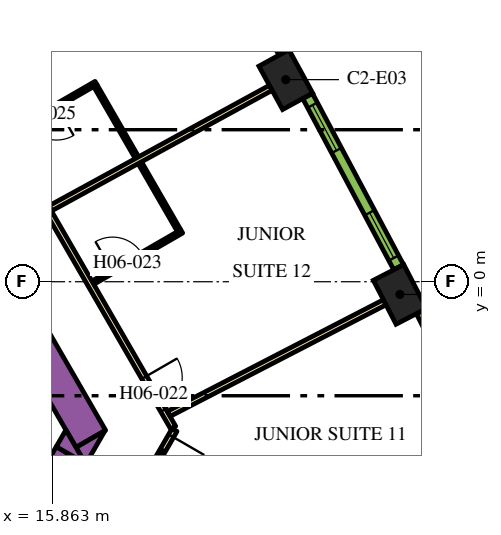
"""IFC4 building model, lengths in metres.
Left out: names, types, materials, properties, quantities, classifications, styles, units other than length and angle.
Written with IfcOpenShell. Run it as: python <this file> out.ifc"""

import sys

from ifc_helpers import new_model, si_unit, direction, frame, frame_2d, origin, origin_2d, place, context, subcontext, project, spatial, polyline, rectangle, outline, extrude, element, fill, save


model = new_model("IFC4")
c1 = context("Model", 3, precision=1e-05, world=origin(), true_north=direction((0.0, 1.0)))
c2 = subcontext(c1, "Body", "Model", "MODEL_VIEW")
j1 = project(units=[si_unit("LENGTHUNIT", "METRE"), si_unit("PLANEANGLEUNIT", "RADIAN")], contexts=[c1])
p1 = place(None, origin())
s1 = spatial("IfcSite", under=j1, at=p1, CompositionType="ELEMENT")
p2 = place(p1, origin())
s2 = spatial("IfcBuilding", under=s1, at=p2, CompositionType="ELEMENT")
p3 = place(p2, frame((0.0, 0.0, 91.5)))
s3 = spatial("IfcBuildingStorey", under=s2, at=p3, CompositionType="ELEMENT", Elevation=91.5)
for number, where, z_axis, x_axis in (
    (1, (25.012, -0.334, 0.0), (0.0, 0.0, 1.0), (-0.459, 0.888, 0.0)),
    (2, (22.009, 5.317, 0.0), (0.0, 0.0, 1.0), (-0.48, 0.877, 0.0)),
):
    element("IfcColumn", number, at=place(p3, frame(where, z_axis=z_axis, x_axis=x_axis)), inside=s3, PredefinedType="COLUMN", context=c2, shape_type="SweptSolid", body=[
        extrude(rectangle(XDim=1.3, YDim=0.9, at=origin_2d()), origin(), (0.0, 0.0, 1.0), 3.9),
    ])
p4 = place(p3, frame((6.776, 13.364, 0.0), z_axis=(0.0, 0.0, 1.0), x_axis=(0.500004177138, -0.8660229921, 0.0)))
e3 = element("IfcWall", 3, at=p4, inside=s3, PredefinedType="SOLIDWALL", context=c2, shape_type="SweptSolid", body=[
    extrude(rectangle(XDim=20.204, YDim=0.9, at=frame_2d((10.102, 0.0))), origin(), (0.0, 0.0, 1.0), 3.9),
])
p5 = place(p3, origin())
e4 = element("IfcWall", 4, at=p5, inside=s3, PredefinedType="SOLIDWALL", context=c2, shape_type="SweptSolid", body=[
    extrude(outline(polyline([(16.743, -4.8), (16.489, -4.36), (17.251, -3.92), (16.743, -4.8)])), origin(), (0.0, 0.0, 1.0), 3.9),
])
p6 = place(p3, frame((11.695, -12.644, 0.0), z_axis=(0.0, 0.0, 1.0), x_axis=(0.500010229568, 0.86601949766, 0.0)))
e5 = element("IfcWall", 5, at=p6, inside=s3, PredefinedType="SOLIDWALL", context=c2, shape_type="SweptSolid", body=[
    extrude(rectangle(XDim=9.326, YDim=0.9, at=frame_2d((4.663, 0.0))), origin(), (0.0, 0.0, 1.0), 3.9),
])
e6 = element("IfcWall", 6, at=p5, inside=s3, PredefinedType="SOLIDWALL", context=c2, shape_type="SweptSolid", body=[
    extrude(outline(polyline([(16.223, -3.9), (16.732, -4.78), (15.969, -4.34), (16.223, -3.9)])), origin(), (0.0, 0.0, 1.0), 3.9),
])
p7 = place(p3, frame((19.081, -3.9, 0.0), z_axis=(0.0, 0.0, 1.0), x_axis=(-0.499974327079, -0.866040225545, 0.0)))
e7 = element("IfcWall", 7, at=p7, inside=s3, PredefinedType="PARTITIONING", context=c2, shape_type="SweptSolid", body=[
    extrude(rectangle(XDim=5.258, YDim=0.15, at=frame_2d((2.629, 0.0))), origin(), (0.0, 0.0, 1.0), 2.75),
])
p8 = place(p7, frame((0.18, 0.0, 0.0)))
e8 = element("IfcOpeningElement", 8, at=p8, cuts=e7, PredefinedType="OPENING", context=c2, shape_type="SweptSolid", body=[
    extrude(rectangle(XDim=1.0, YDim=2.1, at=frame_2d((0.5, 1.05))), frame((0.0, 0.085, 0.0), z_axis=(0.0, -1.0, 0.0), x_axis=(1.0, 0.0, 0.0)), (0.0, 0.0, 1.0), 0.17),
])
p9 = place(p3, frame((6.163, 18.475, 0.0), z_axis=(0.0, 0.0, 1.0), x_axis=(0.500001317485, -0.866024643133, 0.0)))
e9 = element("IfcWall", 9, at=p9, inside=s3, PredefinedType="PARTITIONING", context=c2, shape_type="SweptSolid", body=[
    extrude(rectangle(XDim=25.767, YDim=0.15, at=frame_2d((12.883, 0.0))), origin(), (0.0, 0.0, 1.0), 2.75),
])
p10 = place(p9, frame((24.241, 0.0, 0.0)))
e10 = element("IfcOpeningElement", 10, at=p10, cuts=e9, PredefinedType="OPENING", context=c2, shape_type="SweptSolid", body=[
    extrude(rectangle(XDim=1.0, YDim=2.1, at=frame_2d((0.5, 1.05))), frame((0.0, 0.085, 0.0), z_axis=(0.0, -1.0, 0.0), x_axis=(1.0, 0.0, 0.0)), (0.0, 0.0, 1.0), 0.17),
])
p11 = place(p9, frame((13.144, 0.0, 0.0)))
e11 = element("IfcOpeningElement", 11, at=p11, cuts=e9, PredefinedType="OPENING", context=c2, shape_type="SweptSolid", body=[
    extrude(rectangle(XDim=1.0, YDim=2.1, at=frame_2d((0.5, 1.05))), frame((0.0, 0.085, 0.0), z_axis=(0.0, -1.0, 0.0), x_axis=(1.0, 0.0, 0.0)), (0.0, 0.0, 1.0), 0.17),
])
p12 = place(p9, frame((10.874, 0.0, 0.0)))
e12 = element("IfcOpeningElement", 12, at=p12, cuts=e9, PredefinedType="OPENING", context=c2, shape_type="SweptSolid", body=[
    extrude(rectangle(XDim=0.9, YDim=2.1, at=frame_2d((0.45, 1.05))), frame((0.0, 0.085, 0.0), z_axis=(0.0, -1.0, 0.0), x_axis=(1.0, 0.0, 0.0)), (0.0, 0.0, 1.0), 0.17),
])
p13 = place(p9, frame((3.718, 0.0, 0.0)))
e13 = element("IfcOpeningElement", 13, at=p13, cuts=e9, PredefinedType="OPENING", context=c2, shape_type="SweptSolid", body=[
    extrude(rectangle(XDim=1.1, YDim=2.1, at=frame_2d((0.55, 1.05))), frame((0.0, 0.085, 0.0), z_axis=(0.0, -1.0, 0.0), x_axis=(1.0, 0.0, 0.0)), (0.0, 0.0, 1.0), 0.17),
])
p14 = place(p9, frame((2.411, 0.0, 0.0)))
e14 = element("IfcOpeningElement", 14, at=p14, cuts=e9, PredefinedType="OPENING", context=c2, shape_type="SweptSolid", body=[
    extrude(rectangle(XDim=1.0, YDim=2.1, at=frame_2d((0.5, 1.05))), frame((0.0, 0.085, 0.0), z_axis=(0.0, -1.0, 0.0), x_axis=(1.0, 0.0, 0.0)), (0.0, 0.0, 1.0), 0.17),
])
p15 = place(p3, frame((21.614, 5.102, 0.0), z_axis=(0.0, 0.0, 1.0), x_axis=(-0.877484555087, -0.479604895287, 0.0)))
e15 = element("IfcWall", 15, at=p15, inside=s3, PredefinedType="PARTITIONING", context=c2, shape_type="SweptSolid", body=[
    extrude(rectangle(XDim=6.611, YDim=0.15, at=frame_2d((3.306, 0.0))), origin(), (0.0, 0.0, 1.0), 2.75),
])
p16 = place(p3, frame((24.613, -0.541, 0.0), z_axis=(0.0, 0.0, 1.0), x_axis=(-0.888459912519, -0.458954228487, 0.0)))
e16 = element("IfcWall", 16, at=p16, inside=s3, PredefinedType="PARTITIONING", context=c2, shape_type="SweptSolid", body=[
    extrude(rectangle(XDim=6.392, YDim=0.15, at=frame_2d((3.196, 0.0))), origin(), (0.0, 0.0, 1.0), 2.75),
])
p17 = place(p3, frame((16.931, -0.026, 0.0), z_axis=(0.0, 0.0, 1.0), x_axis=(0.866059108428, 0.4999416173, 0.0)))
e17 = element("IfcWall", 17, at=p17, inside=s3, PredefinedType="PARTITIONING", context=c2, shape_type="SweptSolid", body=[
    extrude(rectangle(XDim=2.7, YDim=0.1, at=frame_2d((1.35, 0.0))), origin(), (0.0, 0.0, 1.0), 2.75),
])
p18 = place(p17, frame((0.6, 0.0, 0.0)))
e18 = element("IfcOpeningElement", 18, at=p18, cuts=e17, PredefinedType="OPENING", context=c2, shape_type="SweptSolid", body=[
    extrude(rectangle(XDim=0.9, YDim=2.1, at=frame_2d((0.45, 1.05))), frame((0.0, 0.06, 0.0), z_axis=(0.0, -1.0, 0.0), x_axis=(1.0, 0.0, 0.0)), (0.0, 0.0, 1.0), 0.12),
])
p19 = place(p3, frame((19.196, 1.351, 0.0), z_axis=(0.0, 0.0, 1.0), x_axis=(-0.499956128963, 0.866050731258, 0.0)))
e19 = element("IfcWall", 19, at=p19, inside=s3, PredefinedType="PARTITIONING", context=c2, shape_type="SweptSolid", body=[
    extrude(rectangle(XDim=2.05, YDim=0.1, at=frame_2d((1.025, 0.0))), origin(), (0.0, 0.0, 1.0), 2.75),
])
p20 = place(p3, frame((17.016, 5.228, 0.0), z_axis=(0.0, 0.0, 1.0), x_axis=(-0.86599734893, -0.500048589285, 0.0)))
e20 = element("IfcWall", 20, at=p20, inside=s3, PredefinedType="PARTITIONING", context=c2, shape_type="SweptSolid", body=[
    extrude(rectangle(XDim=2.7, YDim=0.1, at=frame_2d((1.35, 0.0))), origin(), (0.0, 0.0, 1.0), 2.75),
])
p21 = place(p20, frame((1.2, 0.0, 0.0)))
e21 = element("IfcOpeningElement", 21, at=p21, cuts=e20, PredefinedType="OPENING", context=c2, shape_type="SweptSolid", body=[
    extrude(rectangle(XDim=0.9, YDim=2.1, at=frame_2d((0.45, 1.05))), frame((0.0, 0.06, 0.0), z_axis=(0.0, -1.0, 0.0), x_axis=(1.0, 0.0, 0.0)), (0.0, 0.0, 1.0), 0.12),
])
p22 = place(p3, frame((16.997, 5.16, 0.0), z_axis=(0.0, 0.0, 1.0), x_axis=(0.500011965869, -0.866018495177, 0.0)))
e22 = element("IfcWall", 22, at=p22, inside=s3, PredefinedType="PARTITIONING", context=c2, shape_type="SweptSolid", body=[
    extrude(rectangle(XDim=2.19, YDim=0.1, at=frame_2d((1.095, 0.0))), origin(), (0.0, 0.0, 1.0), 2.75),
])
p23 = place(p3, frame((27.864, -5.336, 0.0), z_axis=(0.0, 0.0, 1.0), x_axis=(-0.448534297211, 0.893765620409, 0.0)))
e23 = element("IfcWall", 23, at=p23, inside=s3, PredefinedType="SOLIDWALL", context=c2, shape_type="SweptSolid", body=[
    extrude(rectangle(XDim=5.1, YDim=0.29, at=frame_2d((2.55, 0.0))), origin(), (0.0, 0.0, 1.0), 3.65),
])
p24 = place(p23, frame((0.272, 0.0, 0.9)))
e24 = element("IfcOpeningElement", 24, at=p24, cuts=e23, PredefinedType="OPENING", context=c2, shape_type="SweptSolid", body=[
    extrude(rectangle(XDim=1.35, YDim=2.15, at=frame_2d((0.675, 1.075))), frame((0.0, 0.155, 0.0), z_axis=(0.0, -1.0, 0.0), x_axis=(1.0, 0.0, 0.0)), (0.0, 0.0, 1.0), 0.31),
])
p25 = place(p23, frame((3.478, 0.0, 0.9)))
e25 = element("IfcOpeningElement", 25, at=p25, cuts=e23, PredefinedType="OPENING", context=c2, shape_type="SweptSolid", body=[
    extrude(rectangle(XDim=1.35, YDim=2.15, at=frame_2d((0.675, 1.075))), frame((0.0, 0.155, 0.0), z_axis=(0.0, -1.0, 0.0), x_axis=(1.0, 0.0, 0.0)), (0.0, 0.0, 1.0), 0.31),
])
p26 = place(p3, frame((24.977, 0.383, 0.0), z_axis=(0.0, 0.0, 1.0), x_axis=(-0.469323203119, 0.883026461106, 0.0)))
e26 = element("IfcWall", 26, at=p26, inside=s3, PredefinedType="SOLIDWALL", context=c2, shape_type="SweptSolid", body=[
    extrude(rectangle(XDim=5.101, YDim=0.29, at=frame_2d((2.55, 0.0))), origin(), (0.0, 0.0, 1.0), 3.65),
])
p27 = place(p26, frame((0.273, 0.0, 0.9)))
e27 = element("IfcOpeningElement", 27, at=p27, cuts=e26, PredefinedType="OPENING", context=c2, shape_type="SweptSolid", body=[
    extrude(rectangle(XDim=1.35, YDim=2.15, at=frame_2d((0.675, 1.075))), frame((0.0, 0.155, 0.0), z_axis=(0.0, -1.0, 0.0), x_axis=(1.0, 0.0, 0.0)), (0.0, 0.0, 1.0), 0.31),
])
p28 = place(p26, frame((3.478, 0.0, 0.9)))
e28 = element("IfcOpeningElement", 28, at=p28, cuts=e26, PredefinedType="OPENING", context=c2, shape_type="SweptSolid", body=[
    extrude(rectangle(XDim=1.35, YDim=2.15, at=frame_2d((0.675, 1.075))), frame((0.0, 0.155, 0.0), z_axis=(0.0, -1.0, 0.0), x_axis=(1.0, 0.0, 0.0)), (0.0, 0.0, 1.0), 0.31),
])
p29 = place(p3, frame((21.956, 6.033, 0.0), z_axis=(0.0, 0.0, 1.0), x_axis=(-0.48983164787, 0.87181704316, 0.0)))
e29 = element("IfcWall", 29, at=p29, inside=s3, PredefinedType="SOLIDWALL", context=c2, shape_type="SweptSolid", body=[
    extrude(rectangle(XDim=5.1, YDim=0.29, at=frame_2d((2.55, 0.0))), origin(), (0.0, 0.0, 1.0), 3.65),
])
p30 = place(p29, frame((0.273, 0.0, 0.9)))
e30 = element("IfcOpeningElement", 30, at=p30, cuts=e29, PredefinedType="OPENING", context=c2, shape_type="SweptSolid", body=[
    extrude(rectangle(XDim=1.35, YDim=2.15, at=frame_2d((0.675, 1.075))), frame((0.0, 0.155, 0.0), z_axis=(0.0, -1.0, 0.0), x_axis=(1.0, 0.0, 0.0)), (0.0, 0.0, 1.0), 0.31),
])
p31 = place(p29, frame((3.478, 0.0, 0.9)))
e31 = element("IfcOpeningElement", 31, at=p31, cuts=e29, PredefinedType="OPENING", context=c2, shape_type="SweptSolid", body=[
    extrude(rectangle(XDim=1.35, YDim=2.15, at=frame_2d((0.675, 1.075))), frame((0.0, 0.155, 0.0), z_axis=(0.0, -1.0, 0.0), x_axis=(1.0, 0.0, 0.0)), (0.0, 0.0, 1.0), 0.31),
])
p32 = place(p8, origin())
e32 = element("IfcDoor", 32, at=p32, inside=s3, OperationType="SINGLE_SWING_LEFT", PredefinedType="DOOR", context=c2, shape_type="SweptSolid", body=[
    extrude(rectangle(XDim=1.0, YDim=2.1, at=frame_2d((0.5, 1.05))), frame((0.0, 0.025, 0.0), z_axis=(0.0, -1.0, 0.0), x_axis=(1.0, 0.0, 0.0)), (0.0, 0.0, 1.0), 0.05),
])
fill(e8, e32)
p33 = place(p10, origin())
e33 = element("IfcDoor", 33, at=p33, inside=s3, OperationType="SINGLE_SWING_RIGHT", PredefinedType="DOOR", context=c2, shape_type="SweptSolid", body=[
    extrude(rectangle(XDim=1.0, YDim=2.1, at=frame_2d((0.5, 1.05))), frame((0.0, 0.025, 0.0), z_axis=(0.0, -1.0, 0.0), x_axis=(1.0, 0.0, 0.0)), (0.0, 0.0, 1.0), 0.05),
])
fill(e10, e33)
p34 = place(p18, origin())
e34 = element("IfcDoor", 34, at=p34, inside=s3, OperationType="SINGLE_SWING_RIGHT", PredefinedType="DOOR", context=c2, shape_type="SweptSolid", body=[
    extrude(rectangle(XDim=0.9, YDim=2.1, at=frame_2d((0.45, 1.05))), frame((0.0, 0.025, 0.0), z_axis=(0.0, -1.0, 0.0), x_axis=(1.0, 0.0, 0.0)), (0.0, 0.0, 1.0), 0.05),
])
fill(e18, e34)
p35 = place(p21, origin())
e35 = element("IfcDoor", 35, at=p35, inside=s3, OperationType="SINGLE_SWING_LEFT", PredefinedType="DOOR", context=c2, shape_type="SweptSolid", body=[
    extrude(rectangle(XDim=0.9, YDim=2.1, at=frame_2d((0.45, 1.05))), frame((0.0, 0.025, 0.0), z_axis=(0.0, -1.0, 0.0), x_axis=(1.0, 0.0, 0.0)), (0.0, 0.0, 1.0), 0.05),
])
fill(e21, e35)
p36 = place(p27, origin())
e36 = element("IfcWindow", 36, at=p36, inside=s3, PartitioningType="DOUBLE_PANEL_VERTICAL", PredefinedType="WINDOW", context=c2, shape_type="SweptSolid", body=[
    extrude(rectangle(XDim=1.35, YDim=2.15, at=frame_2d((0.675, 1.075))), frame((0.0, 0.015, 0.0), z_axis=(0.0, -1.0, 0.0), x_axis=(1.0, 0.0, 0.0)), (0.0, 0.0, 1.0), 0.06),
])
fill(e27, e36)
p37 = place(p28, origin())
e37 = element("IfcWindow", 37, at=p37, inside=s3, PartitioningType="DOUBLE_PANEL_VERTICAL", PredefinedType="WINDOW", context=c2, shape_type="SweptSolid", body=[
    extrude(rectangle(XDim=1.35, YDim=2.15, at=frame_2d((0.675, 1.075))), frame((0.0, 0.015, 0.0), z_axis=(0.0, -1.0, 0.0), x_axis=(1.0, 0.0, 0.0)), (0.0, 0.0, 1.0), 0.06),
])
fill(e28, e37)
save(model, sys.argv[1])
